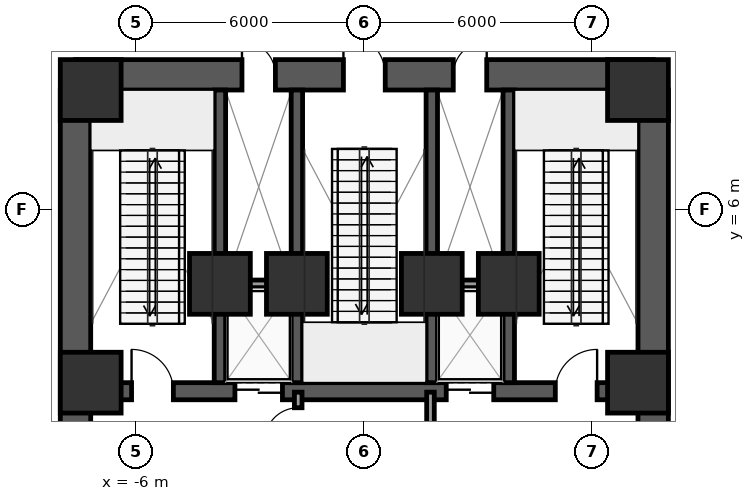
"""IFC4 building model, lengths in metres.
Left out: names, types, materials, properties, quantities, classifications, styles, units other than length and angle.
Written with IfcOpenShell. Run it as: python <this file> out.ifc"""

import sys

from ifc_helpers import new_model, si_unit, direction, frame, frame_2d, origin, origin_2d, place, context, subcontext, project, spatial, rectangle, extrude, element, fill, save


model = new_model("IFC4")
c1 = context("Model", 3, precision=1e-05, world=origin(), true_north=direction((0.0, 1.0)))
c2 = subcontext(c1, "Body", "Model", "MODEL_VIEW")
j1 = project(units=[si_unit("LENGTHUNIT", "METRE"), si_unit("PLANEANGLEUNIT", "RADIAN")], contexts=[c1])
p1 = place(None, origin())
s1 = spatial("IfcSite", under=j1, at=p1, CompositionType="ELEMENT")
p2 = place(p1, origin())
s2 = spatial("IfcBuilding", under=s1, at=p2, CompositionType="ELEMENT")
p3 = place(p2, frame((0.0, 0.0, 11.5)))
s3 = spatial("IfcBuildingStorey", under=s2, at=p3, CompositionType="ELEMENT", Elevation=11.5)
p4 = place(p3, frame((-7.6, 9.55, 0.0), z_axis=(0.0, 0.0, 1.0), x_axis=(1.0, 0.0, 0.0)))
e1 = element("IfcWall", 1, at=p4, inside=s3, PredefinedType="SHEAR", context=c2, shape_type="SweptSolid", body=[
    extrude(rectangle(XDim=15.2, YDim=0.8, at=frame_2d((7.6, 0.0))), origin(), (0.0, 0.0, 1.0), 5.7),
])
p5 = place(p4, frame((7.05, 0.0, 0.0)))
e2 = element("IfcOpeningElement", 2, at=p5, cuts=e1, PredefinedType="OPENING", context=c2, shape_type="SweptSolid", body=[
    extrude(rectangle(XDim=1.1, YDim=2.15, at=frame_2d((0.55, 1.075))), frame((0.0, 0.41, 0.0), z_axis=(0.0, -1.0, 0.0), x_axis=(1.0, 0.0, 0.0)), (0.0, 0.0, 1.0), 0.82),
])
p6 = place(p4, frame((4.38, 0.0, 0.0)))
e3 = element("IfcOpeningElement", 3, at=p6, cuts=e1, PredefinedType="OPENING", context=c2, shape_type="SweptSolid", body=[
    extrude(rectangle(XDim=0.88, YDim=2.15, at=frame_2d((0.44, 1.075))), frame((0.0, 0.41, 0.0), z_axis=(0.0, -1.0, 0.0), x_axis=(1.0, 0.0, 0.0)), (0.0, 0.0, 1.0), 0.82),
])
p7 = place(p4, frame((9.94, 0.0, 0.0)))
e4 = element("IfcOpeningElement", 4, at=p7, cuts=e1, PredefinedType="OPENING", context=c2, shape_type="SweptSolid", body=[
    extrude(rectangle(XDim=0.88, YDim=2.15, at=frame_2d((0.44, 1.075))), frame((0.0, 0.41, 0.0), z_axis=(0.0, -1.0, 0.0), x_axis=(1.0, 0.0, 0.0)), (0.0, 0.0, 1.0), 0.82),
])
p8 = place(p3, frame((-7.2, 1.225, 0.0), z_axis=(0.0, 0.0, 1.0), x_axis=(1.0, 0.0, 0.0)))
e5 = element("IfcWall", 5, at=p8, inside=s3, PredefinedType="SHEAR", context=c2, shape_type="SweptSolid", body=[
    extrude(rectangle(XDim=14.4, YDim=0.45, at=frame_2d((7.2, 0.0))), origin(), (0.0, 0.0, 1.0), 5.7),
])
p9 = place(p8, frame((3.795, 0.0, 0.0)))
e6 = element("IfcOpeningElement", 6, at=p9, cuts=e5, PredefinedType="OPENING", context=c2, shape_type="SweptSolid", body=[
    extrude(rectangle(XDim=1.25, YDim=2.25, at=frame_2d((0.625, 1.125))), frame((0.0, 0.235, 0.0), z_axis=(0.0, -1.0, 0.0), x_axis=(1.0, 0.0, 0.0)), (0.0, 0.0, 1.0), 0.47),
])
p10 = place(p8, frame((9.355, 0.0, 0.0)))
e7 = element("IfcOpeningElement", 7, at=p10, cuts=e5, PredefinedType="OPENING", context=c2, shape_type="SweptSolid", body=[
    extrude(rectangle(XDim=1.25, YDim=2.25, at=frame_2d((0.625, 1.125))), frame((0.0, 0.235, 0.0), z_axis=(0.0, -1.0, 0.0), x_axis=(1.0, 0.0, 0.0)), (0.0, 0.0, 1.0), 0.47),
])
p11 = place(p8, frame((1.075, 0.0, 0.0)))
e8 = element("IfcOpeningElement", 8, at=p11, cuts=e5, PredefinedType="OPENING", context=c2, shape_type="SweptSolid", body=[
    extrude(rectangle(XDim=1.1, YDim=2.15, at=frame_2d((0.55, 1.075))), frame((0.0, 0.235, 0.0), z_axis=(0.0, -1.0, 0.0), x_axis=(1.0, 0.0, 0.0)), (0.0, 0.0, 1.0), 0.47),
])
p12 = place(p8, frame((12.225, 0.0, 0.0)))
e9 = element("IfcOpeningElement", 9, at=p12, cuts=e5, PredefinedType="OPENING", context=c2, shape_type="SweptSolid", body=[
    extrude(rectangle(XDim=1.1, YDim=2.15, at=frame_2d((0.55, 1.075))), frame((0.0, 0.235, 0.0), z_axis=(0.0, -1.0, 0.0), x_axis=(1.0, 0.0, 0.0)), (0.0, 0.0, 1.0), 0.47),
])
for number, where, z_axis, x_axis in (
    (10, (-3.8, 1.45, 0.0), (0.0, 0.0, 1.0), (0.0, 1.0, 0.0)),
    (11, (-1.775, 1.45, 0.0), (0.0, 0.0, 1.0), (0.0, 1.0, 0.0)),
    (12, (1.775, 1.45, 0.0), (0.0, 0.0, 1.0), (0.0, 1.0, 0.0)),
    (13, (3.8, 1.45, 0.0), (0.0, 0.0, 1.0), (0.0, 1.0, 0.0)),
):
    element("IfcWall", number, at=place(p3, frame(where, z_axis=z_axis, x_axis=x_axis)), inside=s3, PredefinedType="SHEAR", context=c2, shape_type="SweptSolid", body=[
        extrude(rectangle(XDim=7.7, YDim=0.3, at=frame_2d((3.85, 0.0))), origin(), (0.0, 0.0, 1.0), 5.7),
    ])
for number, where, z_axis, x_axis in (
    (14, (-7.6, 0.1, 0.0), (0.0, 0.0, 1.0), (0.0, 1.0, 0.0)),
    (15, (7.6, 0.1, 0.0), (0.0, 0.0, 1.0), (0.0, 1.0, 0.0)),
):
    element("IfcWall", number, at=place(p3, frame(where, z_axis=z_axis, x_axis=x_axis)), inside=s3, PredefinedType="SHEAR", context=c2, shape_type="SweptSolid", body=[
        extrude(rectangle(XDim=9.05, YDim=0.8, at=frame_2d((4.525, 0.0))), origin(), (0.0, 0.0, 1.0), 5.7),
    ])
for number, where, z_axis, x_axis in (
    (16, (7.2, 1.45, 0.0), (0.0, 0.0, 1.0), (1.0, 0.0, 0.0)),
    (17, (7.2, 9.15, 0.0), (0.0, 0.0, 1.0), (1.0, 0.0, 0.0)),
    (18, (-7.2, 9.15, 0.0), (0.0, 0.0, 1.0), (1.0, 0.0, 0.0)),
    (19, (-7.2, 1.45, 0.0), (0.0, 0.0, 1.0), (1.0, 0.0, 0.0)),
    (20, (-3.8, 4.05, 0.0), (0.0, 0.0, 1.0), (1.0, 0.0, 0.0)),
    (21, (3.8, 4.05, 0.0), (0.0, 0.0, 1.0), (1.0, 0.0, 0.0)),
    (22, (-1.775, 4.05, 0.0), (0.0, 0.0, 1.0), (1.0, 0.0, 0.0)),
    (23, (1.775, 4.05, 0.0), (0.0, 0.0, 1.0), (1.0, 0.0, 0.0)),
):
    element("IfcColumn", number, at=place(p3, frame(where, z_axis=z_axis, x_axis=x_axis)), inside=s3, PredefinedType="COLUMN", context=c2, shape_type="SweptSolid", body=[
        extrude(rectangle(XDim=1.6, YDim=1.6, at=origin_2d()), origin(), (0.0, 0.0, 1.0), 6.0),
    ])
for number, where, z_axis, x_axis in (
    (24, (-3.65, 4.05, 0.0), (0.0, 0.0, 1.0), (1.0, 0.0, 0.0)),
    (25, (1.92, 4.05, 0.0), (0.0, 0.0, 1.0), (1.0, 0.0, 0.0)),
):
    element("IfcWall", number, at=place(p3, frame(where, z_axis=z_axis, x_axis=x_axis)), inside=s3, PredefinedType="PARTITIONING", context=c2, shape_type="SweptSolid", body=[
        extrude(rectangle(XDim=1.73, YDim=0.2, at=frame_2d((0.865, 0.0))), origin(), (0.0, 0.0, 1.0), 5.7),
    ])
p13 = place(p3, frame((-1.74, -1.78, 0.0), z_axis=(0.0, 0.0, 1.0), x_axis=(0.0, 1.0, 0.0)))
e26 = element("IfcWall", 26, at=p13, inside=s3, PredefinedType="PARTITIONING", context=c2, shape_type="SweptSolid", body=[
    extrude(rectangle(XDim=2.98, YDim=0.2, at=frame_2d((1.49, 0.0))), origin(), (0.0, 0.0, 1.0), 5.7),
])
p14 = place(p13, frame((1.69, 0.0, 0.0)))
e27 = element("IfcOpeningElement", 27, at=p14, cuts=e26, PredefinedType="OPENING", context=c2, shape_type="SweptSolid", body=[
    extrude(rectangle(XDim=0.88, YDim=2.15, at=frame_2d((0.44, 1.075))), frame((0.0, 0.11, 0.0), z_axis=(0.0, -1.0, 0.0), x_axis=(1.0, 0.0, 0.0)), (0.0, 0.0, 1.0), 0.22),
])
p15 = place(p3, frame((1.74, -1.78, 0.0), z_axis=(0.0, 0.0, 1.0), x_axis=(0.0, 1.0, 0.0)))
e28 = element("IfcWall", 28, at=p15, inside=s3, PredefinedType="PARTITIONING", context=c2, shape_type="SweptSolid", body=[
    extrude(rectangle(XDim=2.98, YDim=0.2, at=frame_2d((1.49, 0.0))), origin(), (0.0, 0.0, 1.0), 5.7),
])
p16 = place(p15, frame((0.24, 0.0, 0.0)))
e29 = element("IfcOpeningElement", 29, at=p16, cuts=e28, PredefinedType="OPENING", context=c2, shape_type="SweptSolid", body=[
    extrude(rectangle(XDim=0.88, YDim=2.15, at=frame_2d((0.44, 1.075))), frame((0.0, 0.11, 0.0), z_axis=(0.0, -1.0, 0.0), x_axis=(1.0, 0.0, 0.0)), (0.0, 0.0, 1.0), 0.22),
])
p17 = place(p9, origin())
e30 = element("IfcDoor", 30, at=p17, inside=s3, OperationType="DOUBLE_DOOR_SLIDING", PredefinedType="DOOR", context=c2, shape_type="SweptSolid", body=[
    extrude(rectangle(XDim=1.25, YDim=2.25, at=frame_2d((0.625, 1.125))), frame((0.0, 0.025, 0.0), z_axis=(0.0, -1.0, 0.0), x_axis=(1.0, 0.0, 0.0)), (0.0, 0.0, 1.0), 0.05),
])
fill(e6, e30)
p18 = place(p10, origin())
e31 = element("IfcDoor", 31, at=p18, inside=s3, OperationType="DOUBLE_DOOR_SLIDING", PredefinedType="DOOR", context=c2, shape_type="SweptSolid", body=[
    extrude(rectangle(XDim=1.25, YDim=2.25, at=frame_2d((0.625, 1.125))), frame((0.0, 0.025, 0.0), z_axis=(0.0, -1.0, 0.0), x_axis=(1.0, 0.0, 0.0)), (0.0, 0.0, 1.0), 0.05),
])
fill(e7, e31)
p19 = place(p11, origin())
e32 = element("IfcDoor", 32, at=p19, inside=s3, OperationType="SINGLE_SWING_LEFT", PredefinedType="DOOR", context=c2, shape_type="SweptSolid", body=[
    extrude(rectangle(XDim=1.1, YDim=2.15, at=frame_2d((0.55, 1.075))), frame((0.0, 0.025, 0.0), z_axis=(0.0, -1.0, 0.0), x_axis=(1.0, 0.0, 0.0)), (0.0, 0.0, 1.0), 0.05),
])
fill(e8, e32)
p20 = place(p12, origin())
e33 = element("IfcDoor", 33, at=p20, inside=s3, OperationType="SINGLE_SWING_RIGHT", PredefinedType="DOOR", context=c2, shape_type="SweptSolid", body=[
    extrude(rectangle(XDim=1.1, YDim=2.15, at=frame_2d((0.55, 1.075))), frame((0.0, 0.025, 0.0), z_axis=(0.0, -1.0, 0.0), x_axis=(1.0, 0.0, 0.0)), (0.0, 0.0, 1.0), 0.05),
])
fill(e9, e33)
p21 = place(p5, origin())
e34 = element("IfcDoor", 34, at=p21, inside=s3, OperationType="SINGLE_SWING_LEFT", PredefinedType="DOOR", context=c2, shape_type="SweptSolid", body=[
    extrude(rectangle(XDim=1.1, YDim=2.15, at=frame_2d((0.55, 1.075))), frame((0.0, 0.025, 0.0), z_axis=(0.0, -1.0, 0.0), x_axis=(1.0, 0.0, 0.0)), (0.0, 0.0, 1.0), 0.05),
])
fill(e2, e34)
p22 = place(p6, origin())
e35 = element("IfcDoor", 35, at=p22, inside=s3, OperationType="SINGLE_SWING_LEFT", PredefinedType="DOOR", context=c2, shape_type="SweptSolid", body=[
    extrude(rectangle(XDim=0.88, YDim=2.15, at=frame_2d((0.44, 1.075))), frame((0.0, 0.025, 0.0), z_axis=(0.0, -1.0, 0.0), x_axis=(1.0, 0.0, 0.0)), (0.0, 0.0, 1.0), 0.05),
])
fill(e3, e35)
p23 = place(p7, origin())
e36 = element("IfcDoor", 36, at=p23, inside=s3, OperationType="SINGLE_SWING_RIGHT", PredefinedType="DOOR", context=c2, shape_type="SweptSolid", body=[
    extrude(rectangle(XDim=0.88, YDim=2.15, at=frame_2d((0.44, 1.075))), frame((0.0, 0.025, 0.0), z_axis=(0.0, -1.0, 0.0), x_axis=(1.0, 0.0, 0.0)), (0.0, 0.0, 1.0), 0.05),
])
fill(e4, e36)
p24 = place(p14, origin())
e37 = element("IfcDoor", 37, at=p24, inside=s3, OperationType="SINGLE_SWING_LEFT", PredefinedType="DOOR", context=c2, shape_type="SweptSolid", body=[
    extrude(rectangle(XDim=0.88, YDim=2.15, at=frame_2d((0.44, 1.075))), frame((0.0, 0.025, 0.0), z_axis=(0.0, -1.0, 0.0), x_axis=(1.0, 0.0, 0.0)), (0.0, 0.0, 1.0), 0.05),
])
fill(e27, e37)
save(model, sys.argv[1])
